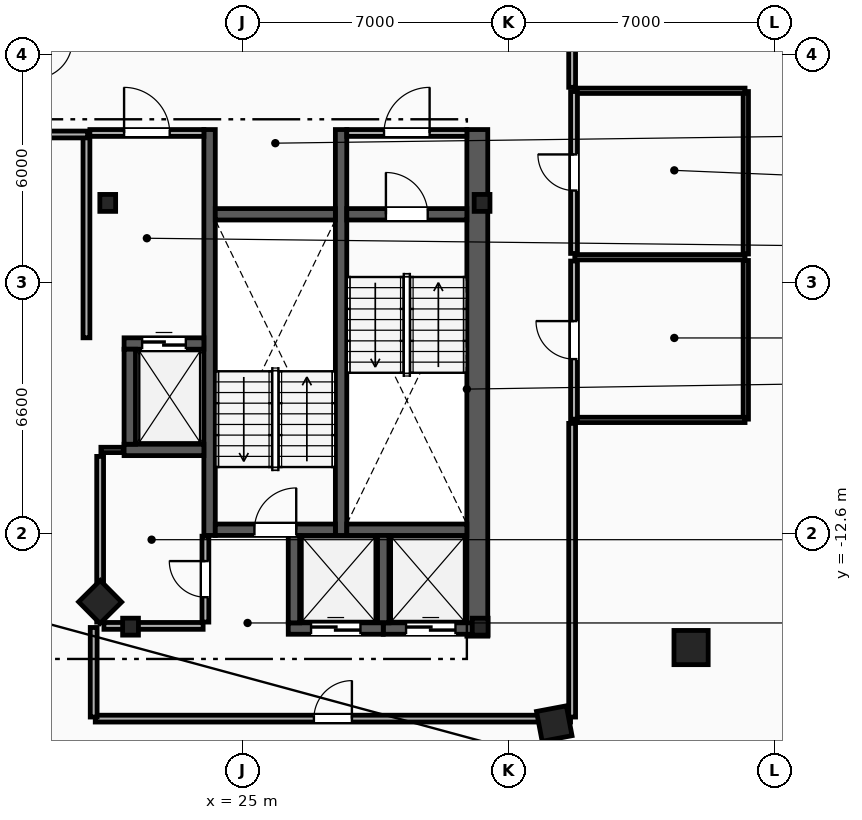
"""IFC4 building model, lengths in metres.
Left out: names, types, materials, properties, quantities, classifications, styles, units other than length and angle.
Written with IfcOpenShell. Run it as: python <this file> out.ifc"""

import sys

from ifc_helpers import new_model, si_unit, direction, frame, frame_2d, origin, origin_2d, place, context, subcontext, project, spatial, rectangle, i_section, extrude, element, fill, save


model = new_model("IFC4")
c1 = context("Model", 3, precision=1e-05, world=origin(), true_north=direction((0.0, 1.0)))
c2 = subcontext(c1, "Body", "Model", "MODEL_VIEW")
j1 = project(units=[si_unit("LENGTHUNIT", "METRE"), si_unit("PLANEANGLEUNIT", "RADIAN")], contexts=[c1])
p1 = place(None, origin())
s1 = spatial("IfcSite", under=j1, at=p1, CompositionType="ELEMENT")
p2 = place(p1, origin())
s2 = spatial("IfcBuilding", under=s1, at=p2, CompositionType="ELEMENT")
p3 = place(p2, frame((0.0, 0.0, 268.4)))
s3 = spatial("IfcBuildingStorey", under=s2, at=p3, CompositionType="ELEMENT", Elevation=268.4)
for number, where, z_axis, x_axis in (
    (1, (31.3, -3.9, 0.0), (0.0, 0.0, 1.0), (1.0, 0.0, 0.0)),
    (2, (21.45, -3.9, 0.0), (0.0, 0.0, 1.0), (1.0, 0.0, 0.0)),
    (3, (22.05, -15.05, 0.0), (0.0, 0.0, 1.0), (1.0, 0.0, 0.0)),
    (4, (31.25, -15.05, 0.0), (0.0, 0.0, 1.0), (1.0, 0.0, 0.0)),
):
    element("IfcColumn", number, at=place(p3, frame(where, z_axis=z_axis, x_axis=x_axis)), inside=s3, PredefinedType="COLUMN", context=c2, shape_type="SweptSolid", body=[
        extrude(i_section(OverallWidth=0.416, OverallDepth=0.446, WebThickness=0.039, FlangeThickness=0.063, FilletRadius=0.018, at=origin_2d()), origin(), (0.0, 0.0, 1.0), 3.6),
    ])
p4 = place(p3, frame((36.8, -15.6, 0.0), z_axis=(0.0, 0.0, 1.0), x_axis=(1.0, 0.0, 0.0)))
e5 = element("IfcColumn", 5, at=p4, inside=s3, PredefinedType="COLUMN", context=c2, shape_type="SweptSolid", body=[
    extrude(rectangle(XDim=0.9, YDim=0.9, at=origin_2d()), origin(), (0.0, 0.0, 1.0), 3.6),
])
for number, where, z_axis, x_axis in (
    (6, (21.25, -14.4, 0.0), (0.0, 0.0, 1.0), (0.703, -0.711, 0.0)),
    (7, (33.2, -17.6, 0.0), (0.0, 0.0, 1.0), (0.983, 0.186, 0.0)),
):
    element("IfcColumn", number, at=place(p3, frame(where, z_axis=z_axis, x_axis=x_axis)), inside=s3, PredefinedType="COLUMN", context=c2, shape_type="SweptSolid", body=[
        extrude(rectangle(XDim=0.8, YDim=0.8, at=origin_2d()), origin(), (0.0, 0.0, 1.0), 3.6),
    ])
p5 = place(p3, frame((31.175, -15.3, 0.0), z_axis=(0.0, 0.0, 1.0), x_axis=(0.0, 1.0, 0.0)))
e8 = element("IfcWall", 8, at=p5, inside=s3, PredefinedType="SHEAR", context=c2, shape_type="SweptSolid", body=[
    extrude(rectangle(XDim=13.33, YDim=0.55, at=frame_2d((6.665, 0.0))), origin(), (0.0, 0.0, 1.0), 3.34),
])
for number, where, z_axis, x_axis in (
    (9, (27.59, -12.65, 0.0), (0.0, 0.0, 1.0), (0.0, 1.0, 0.0)),
    (10, (24.13, -12.65, 0.0), (0.0, 0.0, 1.0), (0.0, 1.0, 0.0)),
):
    element("IfcWall", number, at=place(p3, frame(where, z_axis=z_axis, x_axis=x_axis)), inside=s3, PredefinedType="SHEAR", context=c2, shape_type="SweptSolid", body=[
        extrude(rectangle(XDim=10.68, YDim=0.3, at=frame_2d((5.34, 0.0))), origin(), (0.0, 0.0, 1.0), 3.34),
    ])
p6 = place(p3, frame((27.74, -4.2, 0.0), z_axis=(0.0, 0.0, 1.0), x_axis=(1.0, 0.0, 0.0)))
e11 = element("IfcWall", 11, at=p6, inside=s3, PredefinedType="SHEAR", context=c2, shape_type="SweptSolid", body=[
    extrude(rectangle(XDim=3.16, YDim=0.3, at=frame_2d((1.58, 0.0))), origin(), (0.0, 0.0, 1.0), 3.34),
])
p7 = place(p6, frame((1.03, 0.0, 0.0)))
e12 = element("IfcOpeningElement", 12, at=p7, cuts=e11, PredefinedType="OPENING", context=c2, shape_type="SweptSolid", body=[
    extrude(rectangle(XDim=1.1, YDim=2.15, at=frame_2d((0.55, 1.075))), frame((0.0, 0.16, 0.0), z_axis=(0.0, -1.0, 0.0), x_axis=(1.0, 0.0, 0.0)), (0.0, 0.0, 1.0), 0.32),
])
p8 = place(p3, frame((27.74, -12.5, 0.0), z_axis=(0.0, 0.0, 1.0), x_axis=(1.0, 0.0, 0.0)))
e13 = element("IfcWall", 13, at=p8, inside=s3, PredefinedType="SHEAR", context=c2, shape_type="SweptSolid", body=[
    extrude(rectangle(XDim=3.16, YDim=0.3, at=frame_2d((1.58, 0.0))), origin(), (0.0, 0.0, 1.0), 3.34),
])
p9 = place(p3, frame((24.28, -12.5, 0.0), z_axis=(0.0, 0.0, 1.0), x_axis=(1.0, 0.0, 0.0)))
e14 = element("IfcWall", 14, at=p9, inside=s3, PredefinedType="SHEAR", context=c2, shape_type="SweptSolid", body=[
    extrude(rectangle(XDim=3.16, YDim=0.3, at=frame_2d((1.58, 0.0))), origin(), (0.0, 0.0, 1.0), 3.34),
])
p10 = place(p9, frame((1.03, 0.0, 0.0)))
e15 = element("IfcOpeningElement", 15, at=p10, cuts=e14, PredefinedType="OPENING", context=c2, shape_type="SweptSolid", body=[
    extrude(rectangle(XDim=1.1, YDim=2.15, at=frame_2d((0.55, 1.075))), frame((0.0, 0.16, 0.0), z_axis=(0.0, -1.0, 0.0), x_axis=(1.0, 0.0, 0.0)), (0.0, 0.0, 1.0), 0.32),
])
p11 = place(p3, frame((24.28, -4.2, 0.0), z_axis=(0.0, 0.0, 1.0), x_axis=(1.0, 0.0, 0.0)))
e16 = element("IfcWall", 16, at=p11, inside=s3, PredefinedType="SHEAR", context=c2, shape_type="SweptSolid", body=[
    extrude(rectangle(XDim=3.16, YDim=0.3, at=frame_2d((1.58, 0.0))), origin(), (0.0, 0.0, 1.0), 3.34),
])
p12 = place(p3, frame((20.89, -7.45, 0.0), z_axis=(0.0, 0.0, 1.0), x_axis=(0.0, 1.0, 0.0)))
e17 = element("IfcWall", 17, at=p12, inside=s3, PredefinedType="PARTITIONING", context=c2, shape_type="SweptSolid", body=[
    extrude(rectangle(XDim=5.3, YDim=0.18, at=frame_2d((2.65, 0.0))), origin(), (0.0, 0.0, 1.0), 3.34),
])
p13 = place(p3, frame((20.98, -2.06, 0.0), z_axis=(0.0, 0.0, 1.0), x_axis=(1.0, 0.0, 0.0)))
e18 = element("IfcWall", 18, at=p13, inside=s3, PredefinedType="PARTITIONING", context=c2, shape_type="SweptSolid", body=[
    extrude(rectangle(XDim=3.0, YDim=0.18, at=frame_2d((1.5, 0.0))), origin(), (0.0, 0.0, 1.0), 3.34),
])
p14 = place(p13, frame((0.9, 0.0, 0.0)))
e19 = element("IfcOpeningElement", 19, at=p14, cuts=e18, PredefinedType="OPENING", context=c2, shape_type="SweptSolid", body=[
    extrude(rectangle(XDim=1.2, YDim=2.15, at=frame_2d((0.6, 1.075))), frame((0.0, 0.1, 0.0), z_axis=(0.0, -1.0, 0.0), x_axis=(1.0, 0.0, 0.0)), (0.0, 0.0, 1.0), 0.2),
])
p15 = place(p3, frame((27.74, -2.06, 0.0), z_axis=(0.0, 0.0, 1.0), x_axis=(1.0, 0.0, 0.0)))
e20 = element("IfcWall", 20, at=p15, inside=s3, PredefinedType="PARTITIONING", context=c2, shape_type="SweptSolid", body=[
    extrude(rectangle(XDim=3.16, YDim=0.18, at=frame_2d((1.58, 0.0))), origin(), (0.0, 0.0, 1.0), 3.34),
])
p16 = place(p15, frame((0.98, 0.0, 0.0)))
e21 = element("IfcOpeningElement", 21, at=p16, cuts=e20, PredefinedType="OPENING", context=c2, shape_type="SweptSolid", body=[
    extrude(rectangle(XDim=1.2, YDim=2.15, at=frame_2d((0.6, 1.075))), frame((0.0, 0.1, 0.0), z_axis=(0.0, -1.0, 0.0), x_axis=(1.0, 0.0, 0.0)), (0.0, 0.0, 1.0), 0.2),
])
p17 = place(p3, frame((21.88, -7.6, 0.0), z_axis=(0.0, 0.0, 1.0), x_axis=(1.0, 0.0, 0.0)))
e22 = element("IfcWall", 22, at=p17, inside=s3, PredefinedType="SHEAR", context=c2, shape_type="SweptSolid", body=[
    extrude(rectangle(XDim=2.1, YDim=0.3, at=frame_2d((1.05, 0.0))), origin(), (0.0, 0.0, 1.0), 3.34),
])
p18 = place(p17, frame((0.475, 0.0, 0.0)))
e23 = element("IfcOpeningElement", 23, at=p18, cuts=e22, PredefinedType="OPENING", context=c2, shape_type="SweptSolid", body=[
    extrude(rectangle(XDim=1.15, YDim=2.2, at=frame_2d((0.575, 1.1))), frame((0.0, 0.16, 0.0), z_axis=(0.0, -1.0, 0.0), x_axis=(1.0, 0.0, 0.0)), (0.0, 0.0, 1.0), 0.32),
])
p19 = place(p3, frame((21.88, -10.4, 0.0), z_axis=(0.0, 0.0, 1.0), x_axis=(1.0, 0.0, 0.0)))
e24 = element("IfcWall", 24, at=p19, inside=s3, PredefinedType="SHEAR", context=c2, shape_type="SweptSolid", body=[
    extrude(rectangle(XDim=2.1, YDim=0.3, at=frame_2d((1.05, 0.0))), origin(), (0.0, 0.0, 1.0), 3.34),
])
p20 = place(p3, frame((22.03, -10.25, 0.0), z_axis=(0.0, 0.0, 1.0), x_axis=(0.0, 1.0, 0.0)))
e25 = element("IfcWall", 25, at=p20, inside=s3, PredefinedType="SHEAR", context=c2, shape_type="SweptSolid", body=[
    extrude(rectangle(XDim=2.5, YDim=0.3, at=frame_2d((1.25, 0.0))), origin(), (0.0, 0.0, 1.0), 3.34),
])
p21 = place(p3, frame((28.7, -15.1, 0.0), z_axis=(0.0, 0.0, 1.0), x_axis=(1.0, 0.0, 0.0)))
e26 = element("IfcWall", 26, at=p21, inside=s3, PredefinedType="SHEAR", context=c2, shape_type="SweptSolid", body=[
    extrude(rectangle(XDim=2.5, YDim=0.3, at=frame_2d((1.25, 0.0))), origin(), (0.0, 0.0, 1.0), 3.34),
])
p22 = place(p21, frame((0.6, 0.0, 0.0)))
e27 = element("IfcOpeningElement", 27, at=p22, cuts=e26, PredefinedType="OPENING", context=c2, shape_type="SweptSolid", body=[
    extrude(rectangle(XDim=1.3, YDim=2.2, at=frame_2d((0.65, 1.1))), frame((0.0, 0.16, 0.0), z_axis=(0.0, -1.0, 0.0), x_axis=(1.0, 0.0, 0.0)), (0.0, 0.0, 1.0), 0.32),
])
p23 = place(p3, frame((28.7, -14.95, 0.0), z_axis=(0.0, 0.0, 1.0), x_axis=(0.0, 1.0, 0.0)))
e28 = element("IfcWall", 28, at=p23, inside=s3, PredefinedType="SHEAR", context=c2, shape_type="SweptSolid", body=[
    extrude(rectangle(XDim=2.3, YDim=0.3, at=frame_2d((1.15, 0.0))), origin(), (0.0, 0.0, 1.0), 3.34),
])
p24 = place(p3, frame((26.2, -15.1, 0.0), z_axis=(0.0, 0.0, 1.0), x_axis=(1.0, 0.0, 0.0)))
e29 = element("IfcWall", 29, at=p24, inside=s3, PredefinedType="SHEAR", context=c2, shape_type="SweptSolid", body=[
    extrude(rectangle(XDim=2.5, YDim=0.3, at=frame_2d((1.25, 0.0))), origin(), (0.0, 0.0, 1.0), 3.34),
])
p25 = place(p24, frame((0.6, 0.0, 0.0)))
e30 = element("IfcOpeningElement", 30, at=p25, cuts=e29, PredefinedType="OPENING", context=c2, shape_type="SweptSolid", body=[
    extrude(rectangle(XDim=1.3, YDim=2.2, at=frame_2d((0.65, 1.1))), frame((0.0, 0.16, 0.0), z_axis=(0.0, -1.0, 0.0), x_axis=(1.0, 0.0, 0.0)), (0.0, 0.0, 1.0), 0.32),
])
p26 = place(p3, frame((26.35, -14.95, 0.0), z_axis=(0.0, 0.0, 1.0), x_axis=(0.0, 1.0, 0.0)))
e31 = element("IfcWall", 31, at=p26, inside=s3, PredefinedType="SHEAR", context=c2, shape_type="SweptSolid", body=[
    extrude(rectangle(XDim=2.3, YDim=0.3, at=frame_2d((1.15, 0.0))), origin(), (0.0, 0.0, 1.0), 3.34),
])
p27 = place(p3, frame((21.27, -10.4, 0.0), z_axis=(0.0, 0.0, 1.0), x_axis=(1.0, 0.0, 0.0)))
e32 = element("IfcWall", 32, at=p27, inside=s3, PredefinedType="PARTITIONING", context=c2, shape_type="SweptSolid", body=[
    extrude(rectangle(XDim=0.59, YDim=0.14, at=frame_2d((0.295, 0.0))), origin(), (0.0, 0.0, 1.0), 3.34),
])
p28 = place(p3, frame((21.25, -14.93, 0.0), z_axis=(0.0, 0.0, 1.0), x_axis=(0.0, 1.0, 0.0)))
e33 = element("IfcWall", 33, at=p28, inside=s3, PredefinedType="PARTITIONING", context=c2, shape_type="SweptSolid", body=[
    extrude(rectangle(XDim=4.36, YDim=0.18, at=frame_2d((2.18, 0.0))), origin(), (0.0, 0.0, 1.0), 3.34),
])
p29 = place(p3, frame((21.35, -15.03, 0.0), z_axis=(0.0, 0.0, 1.0), x_axis=(1.0, 0.0, 0.0)))
e34 = element("IfcWall", 34, at=p29, inside=s3, PredefinedType="PARTITIONING", context=c2, shape_type="SweptSolid", body=[
    extrude(rectangle(XDim=2.61, YDim=0.18, at=frame_2d((1.305, 0.0))), origin(), (0.0, 0.0, 1.0), 2.413),
])
p30 = place(p3, frame((24.02, -14.93, 0.0), z_axis=(0.0, 0.0, 1.0), x_axis=(0.0, 1.0, 0.0)))
e35 = element("IfcWall", 35, at=p30, inside=s3, PredefinedType="PARTITIONING", context=c2, shape_type="SweptSolid", body=[
    extrude(rectangle(XDim=2.26, YDim=0.18, at=frame_2d((1.13, 0.0))), origin(), (0.0, 0.0, 1.0), 3.34),
])
p31 = place(p30, frame((0.655, 0.0, 0.0)))
e36 = element("IfcOpeningElement", 36, at=p31, cuts=e35, PredefinedType="OPENING", context=c2, shape_type="SweptSolid", body=[
    extrude(rectangle(XDim=0.95, YDim=2.1, at=frame_2d((0.475, 1.05))), frame((0.0, 0.1, 0.0), z_axis=(0.0, -1.0, 0.0), x_axis=(1.0, 0.0, 0.0)), (0.0, 0.0, 1.0), 0.2),
])
p32 = place(p3, frame((38.24, -9.59, 0.0), z_axis=(0.0, 0.0, 1.0), x_axis=(0.0, 1.0, 0.0)))
e37 = element("IfcWall", 37, at=p32, inside=s3, PredefinedType="PARTITIONING", context=c2, shape_type="SweptSolid", body=[
    extrude(rectangle(XDim=4.175, YDim=0.14, at=frame_2d((2.087, 0.0))), origin(), (0.0, 0.0, 1.0), 3.34),
])
p33 = place(p3, frame((38.24, -5.245, 0.0), z_axis=(0.0, 0.0, 1.0), x_axis=(0.0, 1.0, 0.0)))
e38 = element("IfcWall", 38, at=p33, inside=s3, PredefinedType="PARTITIONING", context=c2, shape_type="SweptSolid", body=[
    extrude(rectangle(XDim=4.275, YDim=0.14, at=frame_2d((2.138, 0.0))), origin(), (0.0, 0.0, 1.0), 3.34),
])
for number, where, z_axis, x_axis in (
    (39, (33.74, -0.95, 0.0), (0.0, 0.0, 1.0), (1.0, 0.0, 0.0)),
    (40, (33.74, -5.33, 0.0), (0.0, 0.0, 1.0), (1.0, 0.0, 0.0)),
    (41, (33.74, -9.61, 0.0), (0.0, 0.0, 1.0), (1.0, 0.0, 0.0)),
):
    element("IfcWall", number, at=place(p3, frame(where, z_axis=z_axis, x_axis=x_axis)), inside=s3, PredefinedType="PARTITIONING", context=c2, shape_type="SweptSolid", body=[
        extrude(rectangle(XDim=4.48, YDim=0.14, at=frame_2d((2.24, 0.0))), origin(), (0.0, 0.0, 1.0), 3.34),
    ])
p34 = place(p3, frame((33.72, -5.23, 0.0), z_axis=(0.0, 0.0, 1.0), x_axis=(0.0, 1.0, 0.0)))
e42 = element("IfcWall", 42, at=p34, inside=s3, PredefinedType="PARTITIONING", context=c2, shape_type="SweptSolid", body=[
    extrude(rectangle(XDim=4.26, YDim=0.18, at=frame_2d((2.13, 0.0))), origin(), (0.0, 0.0, 1.0), 3.34),
])
p35 = place(p34, frame((1.655, 0.0, 0.0)))
e43 = element("IfcOpeningElement", 43, at=p35, cuts=e42, PredefinedType="OPENING", context=c2, shape_type="SweptSolid", body=[
    extrude(rectangle(XDim=0.95, YDim=2.1, at=frame_2d((0.475, 1.05))), frame((0.0, 0.1, 0.0), z_axis=(0.0, -1.0, 0.0), x_axis=(1.0, 0.0, 0.0)), (0.0, 0.0, 1.0), 0.2),
])
p36 = place(p3, frame((33.72, -9.59, 0.0), z_axis=(0.0, 0.0, 1.0), x_axis=(0.0, 1.0, 0.0)))
e44 = element("IfcWall", 44, at=p36, inside=s3, PredefinedType="PARTITIONING", context=c2, shape_type="SweptSolid", body=[
    extrude(rectangle(XDim=4.16, YDim=0.18, at=frame_2d((2.08, 0.0))), origin(), (0.0, 0.0, 1.0), 3.34),
])
p37 = place(p36, frame((1.58, 0.0, 0.0)))
e45 = element("IfcOpeningElement", 45, at=p37, cuts=e44, PredefinedType="OPENING", context=c2, shape_type="SweptSolid", body=[
    extrude(rectangle(XDim=1.0, YDim=2.15, at=frame_2d((0.5, 1.075))), frame((0.0, 0.1, 0.0), z_axis=(0.0, -1.0, 0.0), x_axis=(1.0, 0.0, 0.0)), (0.0, 0.0, 1.0), 0.2),
])
p38 = place(p3, frame((21.122, -17.47, 0.0), z_axis=(0.0, 0.0, 1.0), x_axis=(1.0, 0.0, 0.0)))
e46 = element("IfcWall", 46, at=p38, inside=s3, PredefinedType="PARTITIONING", context=c2, shape_type="SweptSolid", body=[
    extrude(rectangle(XDim=12.507, YDim=0.18, at=frame_2d((6.253, 0.0))), origin(), (0.0, 0.0, 1.0), 3.34),
])
p39 = place(p38, frame((5.753, 0.0, 0.0)))
e47 = element("IfcOpeningElement", 47, at=p39, cuts=e46, PredefinedType="OPENING", context=c2, shape_type="SweptSolid", body=[
    extrude(rectangle(XDim=1.0, YDim=2.15, at=frame_2d((0.5, 1.075))), frame((0.0, 0.1, 0.0), z_axis=(0.0, -1.0, 0.0), x_axis=(1.0, 0.0, 0.0)), (0.0, 0.0, 1.0), 0.2),
])
p40 = place(p3, frame((33.67, -17.428, 0.0), z_axis=(0.0, 0.0, 1.0), x_axis=(0.0, 1.0, 0.0)))
e48 = element("IfcWall", 48, at=p40, inside=s3, PredefinedType="PARTITIONING", context=c2, shape_type="SweptSolid", body=[
    extrude(rectangle(XDim=7.727, YDim=0.18, at=frame_2d((3.864, 0.0))), origin(), (0.0, 0.0, 1.0), 3.34),
])
p41 = place(p3, frame((13.521, -2.1, 0.0), z_axis=(0.0, 0.0, 1.0), x_axis=(1.0, 0.0, 0.0)))
e49 = element("IfcWall", 49, at=p41, inside=s3, PredefinedType="PARTITIONING", context=c2, shape_type="SweptSolid", body=[
    extrude(rectangle(XDim=7.398, YDim=0.18, at=frame_2d((3.699, 0.0))), origin(), (0.0, 0.0, 1.0), 3.34),
])
p42 = place(p3, frame((21.08, -15.072, 0.0), z_axis=(0.0, 0.0, 1.0), x_axis=(0.0, -1.0, 0.0)))
e50 = element("IfcWall", 50, at=p42, inside=s3, PredefinedType="PARTITIONING", context=c2, shape_type="SweptSolid", body=[
    extrude(rectangle(XDim=2.357, YDim=0.18, at=frame_2d((1.178, 0.0))), origin(), (0.0, 0.0, 1.0), 3.34),
])
p43 = place(p3, frame((33.67, -0.859, 0.0), z_axis=(0.0, 0.0, 1.0), x_axis=(0.0, 1.0, 0.0)))
e51 = element("IfcWall", 51, at=p43, inside=s3, PredefinedType="PARTITIONING", context=c2, shape_type="SweptSolid", body=[
    extrude(rectangle(XDim=1.187, YDim=0.18, at=frame_2d((0.594, 0.0))), origin(), (0.0, 0.0, 1.0), 3.34),
])
p44 = place(p7, origin())
e52 = element("IfcDoor", 52, at=p44, inside=s3, OperationType="SINGLE_SWING_LEFT", PredefinedType="DOOR", context=c2, shape_type="SweptSolid", body=[
    extrude(rectangle(XDim=1.1, YDim=2.15, at=frame_2d((0.55, 1.075))), frame((0.0, 0.025, 0.0), z_axis=(0.0, -1.0, 0.0), x_axis=(1.0, 0.0, 0.0)), (0.0, 0.0, 1.0), 0.05),
])
fill(e12, e52)
p45 = place(p10, origin())
e53 = element("IfcDoor", 53, at=p45, inside=s3, OperationType="SINGLE_SWING_RIGHT", PredefinedType="DOOR", context=c2, shape_type="SweptSolid", body=[
    extrude(rectangle(XDim=1.1, YDim=2.15, at=frame_2d((0.55, 1.075))), frame((0.0, 0.025, 0.0), z_axis=(0.0, -1.0, 0.0), x_axis=(1.0, 0.0, 0.0)), (0.0, 0.0, 1.0), 0.05),
])
fill(e15, e53)
p46 = place(p14, origin())
e54 = element("IfcDoor", 54, at=p46, inside=s3, OperationType="SINGLE_SWING_LEFT", PredefinedType="DOOR", context=c2, shape_type="SweptSolid", body=[
    extrude(rectangle(XDim=1.2, YDim=2.15, at=frame_2d((0.6, 1.075))), frame((0.0, 0.025, 0.0), z_axis=(0.0, -1.0, 0.0), x_axis=(1.0, 0.0, 0.0)), (0.0, 0.0, 1.0), 0.05),
])
fill(e19, e54)
p47 = place(p16, origin())
e55 = element("IfcDoor", 55, at=p47, inside=s3, OperationType="SINGLE_SWING_RIGHT", PredefinedType="DOOR", context=c2, shape_type="SweptSolid", body=[
    extrude(rectangle(XDim=1.2, YDim=2.15, at=frame_2d((0.6, 1.075))), frame((0.0, 0.025, 0.0), z_axis=(0.0, -1.0, 0.0), x_axis=(1.0, 0.0, 0.0)), (0.0, 0.0, 1.0), 0.05),
])
fill(e21, e55)
p48 = place(p18, origin())
e56 = element("IfcDoor", 56, at=p48, inside=s3, OperationType="SLIDING_TO_LEFT", PredefinedType="TRAPDOOR", context=c2, shape_type="SweptSolid", body=[
    extrude(rectangle(XDim=1.15, YDim=2.2, at=frame_2d((0.575, 1.1))), frame((0.0, 0.025, 0.0), z_axis=(0.0, -1.0, 0.0), x_axis=(1.0, 0.0, 0.0)), (0.0, 0.0, 1.0), 0.05),
])
fill(e23, e56)
p49 = place(p22, origin())
e57 = element("IfcDoor", 57, at=p49, inside=s3, OperationType="SLIDING_TO_LEFT", PredefinedType="TRAPDOOR", context=c2, shape_type="SweptSolid", body=[
    extrude(rectangle(XDim=1.3, YDim=2.2, at=frame_2d((0.65, 1.1))), frame((0.0, 0.025, 0.0), z_axis=(0.0, -1.0, 0.0), x_axis=(1.0, 0.0, 0.0)), (0.0, 0.0, 1.0), 0.05),
])
fill(e27, e57)
p50 = place(p25, origin())
e58 = element("IfcDoor", 58, at=p50, inside=s3, OperationType="SLIDING_TO_LEFT", PredefinedType="TRAPDOOR", context=c2, shape_type="SweptSolid", body=[
    extrude(rectangle(XDim=1.3, YDim=2.2, at=frame_2d((0.65, 1.1))), frame((0.0, 0.025, 0.0), z_axis=(0.0, -1.0, 0.0), x_axis=(1.0, 0.0, 0.0)), (0.0, 0.0, 1.0), 0.05),
])
fill(e30, e58)
p51 = place(p39, origin())
e59 = element("IfcDoor", 59, at=p51, inside=s3, OperationType="SINGLE_SWING_RIGHT", PredefinedType="DOOR", context=c2, shape_type="SweptSolid", body=[
    extrude(rectangle(XDim=1.0, YDim=2.15, at=frame_2d((0.5, 1.075))), frame((0.0, 0.025, 0.0), z_axis=(0.0, -1.0, 0.0), x_axis=(1.0, 0.0, 0.0)), (0.0, 0.0, 1.0), 0.05),
])
fill(e47, e59)
p52 = place(p35, origin())
e60 = element("IfcDoor", 60, at=p52, inside=s3, OperationType="SINGLE_SWING_RIGHT", PredefinedType="DOOR", context=c2, shape_type="SweptSolid", body=[
    extrude(rectangle(XDim=0.95, YDim=2.1, at=frame_2d((0.475, 1.05))), frame((0.0, 0.025, 0.0), z_axis=(0.0, -1.0, 0.0), x_axis=(1.0, 0.0, 0.0)), (0.0, 0.0, 1.0), 0.05),
])
fill(e43, e60)
p53 = place(p37, origin())
e61 = element("IfcDoor", 61, at=p53, inside=s3, OperationType="SINGLE_SWING_RIGHT", PredefinedType="DOOR", context=c2, shape_type="SweptSolid", body=[
    extrude(rectangle(XDim=1.0, YDim=2.15, at=frame_2d((0.5, 1.075))), frame((0.0, 0.025, 0.0), z_axis=(0.0, -1.0, 0.0), x_axis=(1.0, 0.0, 0.0)), (0.0, 0.0, 1.0), 0.05),
])
fill(e45, e61)
p54 = place(p31, origin())
e62 = element("IfcDoor", 62, at=p54, inside=s3, OperationType="SINGLE_SWING_RIGHT", PredefinedType="DOOR", context=c2, shape_type="SweptSolid", body=[
    extrude(rectangle(XDim=0.95, YDim=2.1, at=frame_2d((0.475, 1.05))), frame((0.0, 0.025, 0.0), z_axis=(0.0, -1.0, 0.0), x_axis=(1.0, 0.0, 0.0)), (0.0, 0.0, 1.0), 0.05),
])
fill(e36, e62)
save(model, sys.argv[1])
